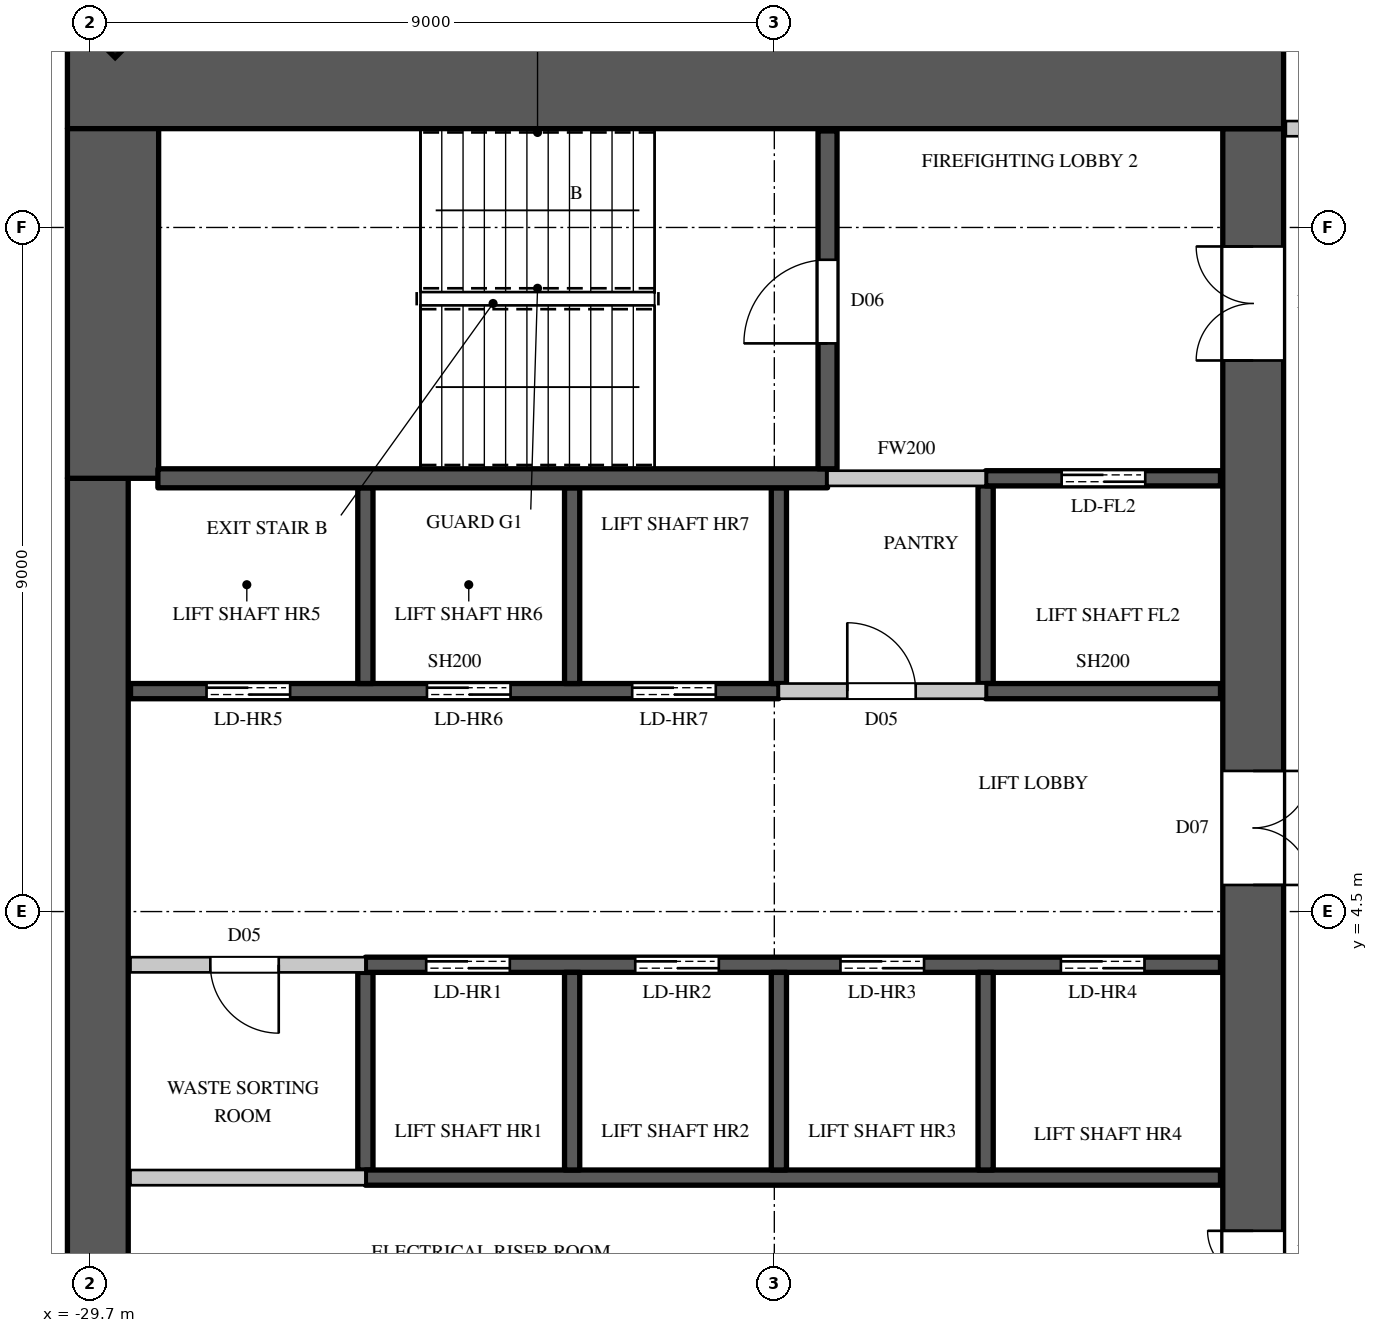
"""IFC4 building model, lengths in metres.
Left out: names, types, materials, properties, quantities, classifications, styles, units other than length and angle.
Written with IfcOpenShell. Run it as: python <this file> out.ifc"""

import sys

from ifc_helpers import new_model, si_unit, direction, frame, frame_2d, origin, origin_2d, place, context, subcontext, project, spatial, rectangle, extrude, element, fill, save


model = new_model("IFC4")
c1 = context("Model", 3, precision=1e-05, world=origin(), true_north=direction((0.0, 1.0)))
c2 = subcontext(c1, "Body", "Model", "MODEL_VIEW")
j1 = project(units=[si_unit("LENGTHUNIT", "METRE"), si_unit("PLANEANGLEUNIT", "RADIAN")], contexts=[c1])
p1 = place(None, origin())
s1 = spatial("IfcSite", under=j1, at=p1, CompositionType="ELEMENT")
p2 = place(p1, origin())
s2 = spatial("IfcBuilding", under=s1, at=p2, CompositionType="ELEMENT")
p3 = place(p2, frame((0.0, 0.0, 168.7)))
s3 = spatial("IfcBuildingStorey", under=s2, at=p3, CompositionType="ELEMENT", Elevation=168.7)
p4 = place(p3, frame((-29.443, 16.443, 0.0), z_axis=(0.0, 0.0, 1.0), x_axis=(-0.707106781187, -0.707106781187, 0.0)))
e1 = element("IfcColumn", 1, at=p4, inside=s3, PredefinedType="COLUMN", context=c2, shape_type="SweptSolid", body=[
    extrude(rectangle(XDim=0.9, YDim=1.1, at=origin_2d()), origin(), (0.0, 0.0, 1.0), 4.1),
])
p5 = place(p3, frame((-30.0, 15.4, 0.0), z_axis=(0.0, 0.0, 1.0), x_axis=(1.0, 0.0, 0.0)))
e2 = element("IfcWall", 2, at=p5, inside=s3, PredefinedType="SHEAR", context=c2, shape_type="SweptSolid", body=[
    extrude(rectangle(XDim=16.0, YDim=1.2, at=frame_2d((8.0, 0.0))), origin(), (0.0, 0.0, 1.0), 4.1),
])
p6 = place(p3, frame((-14.4, -14.8, 0.0), z_axis=(0.0, 0.0, 1.0), x_axis=(0.0, 1.0, 0.0)))
e3 = element("IfcWall", 3, at=p6, inside=s3, PredefinedType="SHEAR", context=c2, shape_type="SweptSolid", body=[
    extrude(rectangle(XDim=29.6, YDim=0.8, at=frame_2d((14.8, 0.0))), origin(), (0.0, 0.0, 1.0), 4.1),
])
p7 = place(p6, frame((1.55, 0.0, 0.0)))
e4 = element("IfcOpeningElement", 4, at=p7, cuts=e3, PredefinedType="OPENING", context=c2, shape_type="SweptSolid", body=[
    extrude(rectangle(XDim=1.5, YDim=2.4, at=frame_2d((0.75, 1.2))), frame((0.0, 0.41, 0.0), z_axis=(0.0, -1.0, 0.0), x_axis=(1.0, 0.0, 0.0)), (0.0, 0.0, 1.0), 0.82),
])
p8 = place(p6, frame((26.55, 0.0, 0.0)))
e5 = element("IfcOpeningElement", 5, at=p8, cuts=e3, PredefinedType="OPENING", context=c2, shape_type="SweptSolid", body=[
    extrude(rectangle(XDim=1.5, YDim=2.4, at=frame_2d((0.75, 1.2))), frame((0.0, 0.41, 0.0), z_axis=(0.0, -1.0, 0.0), x_axis=(1.0, 0.0, 0.0)), (0.0, 0.0, 1.0), 0.82),
])
p9 = place(p6, frame((8.45, 0.0, 0.0)))
e6 = element("IfcOpeningElement", 6, at=p9, cuts=e3, PredefinedType="OPENING", context=c2, shape_type="SweptSolid", body=[
    extrude(rectangle(XDim=1.5, YDim=2.4, at=frame_2d((0.75, 1.2))), frame((0.0, 0.41, 0.0), z_axis=(0.0, -1.0, 0.0), x_axis=(1.0, 0.0, 0.0)), (0.0, 0.0, 1.0), 0.82),
])
p10 = place(p6, frame((19.65, 0.0, 0.0)))
e7 = element("IfcOpeningElement", 7, at=p10, cuts=e3, PredefinedType="OPENING", context=c2, shape_type="SweptSolid", body=[
    extrude(rectangle(XDim=1.5, YDim=2.4, at=frame_2d((0.75, 1.2))), frame((0.0, 0.41, 0.0), z_axis=(0.0, -1.0, 0.0), x_axis=(1.0, 0.0, 0.0)), (0.0, 0.0, 1.0), 0.82),
])
p11 = place(p6, frame((14.5, 0.0, 0.0)))
e8 = element("IfcOpeningElement", 8, at=p11, cuts=e3, PredefinedType="OPENING", context=c2, shape_type="SweptSolid", body=[
    extrude(rectangle(XDim=0.6, YDim=2.0, at=frame_2d((0.3, 1.0))), frame((0.0, 0.41, 0.0), z_axis=(0.0, -1.0, 0.0), x_axis=(1.0, 0.0, 0.0)), (0.0, 0.0, 1.0), 0.82),
])
p12 = place(p3, frame((-29.6, -10.2, 0.0), z_axis=(0.0, 0.0, 1.0), x_axis=(0.0, 1.0, 0.0)))
e9 = element("IfcWall", 9, at=p12, inside=s3, PredefinedType="SHEAR", context=c2, shape_type="SweptSolid", body=[
    extrude(rectangle(XDim=20.4, YDim=0.8, at=frame_2d((10.2, 0.0))), origin(), (0.0, 0.0, 1.0), 4.1),
])
p13 = place(p3, frame((-29.4, 10.2, 0.0), z_axis=(0.0, 0.0, 1.0), x_axis=(0.0, 1.0, 0.0)))
e10 = element("IfcWall", 10, at=p13, inside=s3, PredefinedType="SHEAR", context=c2, shape_type="SweptSolid", body=[
    extrude(rectangle(XDim=4.6, YDim=1.2, at=frame_2d((2.3, 0.0))), origin(), (0.0, 0.0, 1.0), 4.1),
])
p14 = place(p3, frame((-29.17, 3.8, 0.0), z_axis=(0.0, 0.0, 1.0), x_axis=(1.0, 0.0, 0.0)))
e11 = element("IfcWall", 11, at=p14, inside=s3, PredefinedType="PARTITIONING", context=c2, shape_type="SweptSolid", body=[
    extrude(rectangle(XDim=3.09, YDim=0.2, at=frame_2d((1.545, 0.0))), origin(), (0.0, 0.0, 1.0), 3.8),
])
p15 = place(p14, frame((1.05, 0.0, 0.0)))
e12 = element("IfcOpeningElement", 12, at=p15, cuts=e11, PredefinedType="OPENING", context=c2, shape_type="SweptSolid", body=[
    extrude(rectangle(XDim=0.9, YDim=2.2, at=frame_2d((0.45, 1.1))), frame((0.0, 0.11, 0.0), z_axis=(0.0, -1.0, 0.0), x_axis=(1.0, 0.0, 0.0)), (0.0, 0.0, 1.0), 0.22),
])
p16 = place(p3, frame((-20.64, 7.4, 0.0), z_axis=(0.0, 0.0, 1.0), x_axis=(1.0, 0.0, 0.0)))
e13 = element("IfcWall", 13, at=p16, inside=s3, PredefinedType="PARTITIONING", context=c2, shape_type="SweptSolid", body=[
    extrude(rectangle(XDim=2.72, YDim=0.2, at=frame_2d((1.36, 0.0))), origin(), (0.0, 0.0, 1.0), 3.8),
])
p17 = place(p16, frame((0.9, 0.0, 0.0)))
e14 = element("IfcOpeningElement", 14, at=p17, cuts=e13, PredefinedType="OPENING", context=c2, shape_type="SweptSolid", body=[
    extrude(rectangle(XDim=0.9, YDim=2.2, at=frame_2d((0.45, 1.1))), frame((0.0, 0.11, 0.0), z_axis=(0.0, -1.0, 0.0), x_axis=(1.0, 0.0, 0.0)), (0.0, 0.0, 1.0), 0.22),
])
p18 = place(p3, frame((-20.0, 10.2, 0.0), z_axis=(0.0, 0.0, 1.0), x_axis=(1.0, 0.0, 0.0)))
e15 = element("IfcWall", 15, at=p18, inside=s3, PredefinedType="PARTITIONING", context=c2, shape_type="SweptSolid", body=[
    extrude(rectangle(XDim=2.08, YDim=0.2, at=frame_2d((1.04, 0.0))), origin(), (0.0, 0.0, 1.0), 3.8),
])
p19 = place(p3, frame((-13.97, 14.8, 0.0), z_axis=(0.0, 0.0, 1.0), x_axis=(1.0, 0.0, 0.0)))
e16 = element("IfcWall", 16, at=p19, inside=s3, PredefinedType="PARTITIONING", context=c2, shape_type="SweptSolid", body=[
    extrude(rectangle(XDim=2.87, YDim=0.2, at=frame_2d((1.435, 0.0))), origin(), (0.0, 0.0, 1.0), 3.8),
])
p20 = place(p3, frame((-29.17, 1.0, 0.0), z_axis=(0.0, 0.0, 1.0), x_axis=(1.0, 0.0, 0.0)))
e17 = element("IfcWall", 17, at=p20, inside=s3, PredefinedType="PARTITIONING", context=c2, shape_type="SweptSolid", body=[
    extrude(rectangle(XDim=3.09, YDim=0.2, at=frame_2d((1.545, 0.0))), origin(), (0.0, 0.0, 1.0), 3.8),
])
p21 = place(p3, frame((-29.17, 7.4, 0.0), z_axis=(0.0, 0.0, 1.0), x_axis=(1.0, 0.0, 0.0)))
e18 = element("IfcWall", 18, at=p21, inside=s3, PredefinedType="SHEAR", context=c2, shape_type="SweptSolid", body=[
    extrude(rectangle(XDim=8.53, YDim=0.2, at=frame_2d((4.265, 0.0))), origin(), (0.0, 0.0, 1.0), 3.8),
])
p22 = place(p21, frame((1.0, 0.0, 0.0)))
e19 = element("IfcOpeningElement", 19, at=p22, cuts=e18, PredefinedType="OPENING", context=c2, shape_type="SweptSolid", body=[
    extrude(rectangle(XDim=1.1, YDim=2.2, at=frame_2d((0.55, 1.1))), frame((0.0, 0.11, 0.0), z_axis=(0.0, -1.0, 0.0), x_axis=(1.0, 0.0, 0.0)), (0.0, 0.0, 1.0), 0.22),
])
p23 = place(p21, frame((3.9, 0.0, 0.0)))
e20 = element("IfcOpeningElement", 20, at=p23, cuts=e18, PredefinedType="OPENING", context=c2, shape_type="SweptSolid", body=[
    extrude(rectangle(XDim=1.1, YDim=2.2, at=frame_2d((0.55, 1.1))), frame((0.0, 0.11, 0.0), z_axis=(0.0, -1.0, 0.0), x_axis=(1.0, 0.0, 0.0)), (0.0, 0.0, 1.0), 0.22),
])
p24 = place(p21, frame((6.6, 0.0, 0.0)))
e21 = element("IfcOpeningElement", 21, at=p24, cuts=e18, PredefinedType="OPENING", context=c2, shape_type="SweptSolid", body=[
    extrude(rectangle(XDim=1.1, YDim=2.2, at=frame_2d((0.55, 1.1))), frame((0.0, 0.11, 0.0), z_axis=(0.0, -1.0, 0.0), x_axis=(1.0, 0.0, 0.0)), (0.0, 0.0, 1.0), 0.22),
])
p25 = place(p3, frame((-26.08, 1.1, 0.0), z_axis=(0.0, 0.0, 1.0), x_axis=(0.0, 1.0, 0.0)))
e22 = element("IfcWall", 22, at=p25, inside=s3, PredefinedType="SHEAR", context=c2, shape_type="SweptSolid", body=[
    extrude(rectangle(XDim=2.6, YDim=0.2, at=frame_2d((1.3, 0.0))), origin(), (0.0, 0.0, 1.0), 3.8),
])
p26 = place(p3, frame((-26.08, 1.0, 0.0), z_axis=(0.0, 0.0, 1.0), x_axis=(1.0, 0.0, 0.0)))
e23 = element("IfcWall", 23, at=p26, inside=s3, PredefinedType="SHEAR", context=c2, shape_type="SweptSolid", body=[
    extrude(rectangle(XDim=11.25, YDim=0.2, at=frame_2d((5.625, 0.0))), origin(), (0.0, 0.0, 1.0), 3.8),
])
p27 = place(p3, frame((-26.08, 3.8, 0.0), z_axis=(0.0, 0.0, 1.0), x_axis=(1.0, 0.0, 0.0)))
e24 = element("IfcWall", 24, at=p27, inside=s3, PredefinedType="SHEAR", context=c2, shape_type="SweptSolid", body=[
    extrude(rectangle(XDim=11.25, YDim=0.2, at=frame_2d((5.625, 0.0))), origin(), (0.0, 0.0, 1.0), 3.8),
])
p28 = place(p27, frame((0.8, 0.0, 0.0)))
e25 = element("IfcOpeningElement", 25, at=p28, cuts=e24, PredefinedType="OPENING", context=c2, shape_type="SweptSolid", body=[
    extrude(rectangle(XDim=1.1, YDim=2.2, at=frame_2d((0.55, 1.1))), frame((0.0, 0.11, 0.0), z_axis=(0.0, -1.0, 0.0), x_axis=(1.0, 0.0, 0.0)), (0.0, 0.0, 1.0), 0.22),
])
p29 = place(p27, frame((3.55, 0.0, 0.0)))
e26 = element("IfcOpeningElement", 26, at=p29, cuts=e24, PredefinedType="OPENING", context=c2, shape_type="SweptSolid", body=[
    extrude(rectangle(XDim=1.1, YDim=2.2, at=frame_2d((0.55, 1.1))), frame((0.0, 0.11, 0.0), z_axis=(0.0, -1.0, 0.0), x_axis=(1.0, 0.0, 0.0)), (0.0, 0.0, 1.0), 0.22),
])
p30 = place(p27, frame((6.25, 0.0, 0.0)))
e27 = element("IfcOpeningElement", 27, at=p30, cuts=e24, PredefinedType="OPENING", context=c2, shape_type="SweptSolid", body=[
    extrude(rectangle(XDim=1.1, YDim=2.2, at=frame_2d((0.55, 1.1))), frame((0.0, 0.11, 0.0), z_axis=(0.0, -1.0, 0.0), x_axis=(1.0, 0.0, 0.0)), (0.0, 0.0, 1.0), 0.22),
])
p31 = place(p27, frame((9.15, 0.0, 0.0)))
e28 = element("IfcOpeningElement", 28, at=p31, cuts=e24, PredefinedType="OPENING", context=c2, shape_type="SweptSolid", body=[
    extrude(rectangle(XDim=1.1, YDim=2.2, at=frame_2d((0.55, 1.1))), frame((0.0, 0.11, 0.0), z_axis=(0.0, -1.0, 0.0), x_axis=(1.0, 0.0, 0.0)), (0.0, 0.0, 1.0), 0.22),
])
p32 = place(p3, frame((-26.08, 7.5, 0.0), z_axis=(0.0, 0.0, 1.0), x_axis=(0.0, 1.0, 0.0)))
e29 = element("IfcWall", 29, at=p32, inside=s3, PredefinedType="SHEAR", context=c2, shape_type="SweptSolid", body=[
    extrude(rectangle(XDim=2.575, YDim=0.2, at=frame_2d((1.288, 0.0))), origin(), (0.0, 0.0, 1.0), 4.1),
])
p33 = place(p3, frame((-23.36, 1.1, 0.0), z_axis=(0.0, 0.0, 1.0), x_axis=(0.0, 1.0, 0.0)))
e30 = element("IfcWall", 30, at=p33, inside=s3, PredefinedType="SHEAR", context=c2, shape_type="SweptSolid", body=[
    extrude(rectangle(XDim=2.6, YDim=0.2, at=frame_2d((1.3, 0.0))), origin(), (0.0, 0.0, 1.0), 4.1),
])
p34 = place(p3, frame((-23.36, 7.5, 0.0), z_axis=(0.0, 0.0, 1.0), x_axis=(0.0, 1.0, 0.0)))
e31 = element("IfcWall", 31, at=p34, inside=s3, PredefinedType="SHEAR", context=c2, shape_type="SweptSolid", body=[
    extrude(rectangle(XDim=2.575, YDim=0.2, at=frame_2d((1.288, 0.0))), origin(), (0.0, 0.0, 1.0), 4.1),
])
p35 = place(p3, frame((-20.64, 1.1, 0.0), z_axis=(0.0, 0.0, 1.0), x_axis=(0.0, 1.0, 0.0)))
e32 = element("IfcWall", 32, at=p35, inside=s3, PredefinedType="SHEAR", context=c2, shape_type="SweptSolid", body=[
    extrude(rectangle(XDim=2.6, YDim=0.2, at=frame_2d((1.3, 0.0))), origin(), (0.0, 0.0, 1.0), 4.1),
])
p36 = place(p3, frame((-20.64, 7.5, 0.0), z_axis=(0.0, 0.0, 1.0), x_axis=(0.0, 1.0, 0.0)))
e33 = element("IfcWall", 33, at=p36, inside=s3, PredefinedType="SHEAR", context=c2, shape_type="SweptSolid", body=[
    extrude(rectangle(XDim=2.575, YDim=0.2, at=frame_2d((1.288, 0.0))), origin(), (0.0, 0.0, 1.0), 3.8),
])
p37 = place(p3, frame((-17.92, 1.1, 0.0), z_axis=(0.0, 0.0, 1.0), x_axis=(0.0, 1.0, 0.0)))
e34 = element("IfcWall", 34, at=p37, inside=s3, PredefinedType="SHEAR", context=c2, shape_type="SweptSolid", body=[
    extrude(rectangle(XDim=2.6, YDim=0.2, at=frame_2d((1.3, 0.0))), origin(), (0.0, 0.0, 1.0), 4.1),
])
p38 = place(p3, frame((-17.92, 7.5, 0.0), z_axis=(0.0, 0.0, 1.0), x_axis=(0.0, 1.0, 0.0)))
e35 = element("IfcWall", 35, at=p38, inside=s3, PredefinedType="SHEAR", context=c2, shape_type="SweptSolid", body=[
    extrude(rectangle(XDim=2.6, YDim=0.2, at=frame_2d((1.3, 0.0))), origin(), (0.0, 0.0, 1.0), 3.8),
])
p39 = place(p3, frame((-17.92, 7.4, 0.0), z_axis=(0.0, 0.0, 1.0), x_axis=(1.0, 0.0, 0.0)))
e36 = element("IfcWall", 36, at=p39, inside=s3, PredefinedType="SHEAR", context=c2, shape_type="SweptSolid", body=[
    extrude(rectangle(XDim=3.09, YDim=0.2, at=frame_2d((1.545, 0.0))), origin(), (0.0, 0.0, 1.0), 3.8),
])
p40 = place(p3, frame((-17.92, 10.2, 0.0), z_axis=(0.0, 0.0, 1.0), x_axis=(1.0, 0.0, 0.0)))
e37 = element("IfcWall", 37, at=p40, inside=s3, PredefinedType="SHEAR", context=c2, shape_type="SweptSolid", body=[
    extrude(rectangle(XDim=3.09, YDim=0.2, at=frame_2d((1.545, 0.0))), origin(), (0.0, 0.0, 1.0), 3.8),
])
p41 = place(p40, frame((1.0, 0.0, 0.0)))
e38 = element("IfcOpeningElement", 38, at=p41, cuts=e37, PredefinedType="OPENING", context=c2, shape_type="SweptSolid", body=[
    extrude(rectangle(XDim=1.1, YDim=2.2, at=frame_2d((0.55, 1.1))), frame((0.0, 0.11, 0.0), z_axis=(0.0, -1.0, 0.0), x_axis=(1.0, 0.0, 0.0)), (0.0, 0.0, 1.0), 0.22),
])
p42 = place(p3, frame((-28.81, 10.2, 0.0), z_axis=(0.0, 0.0, 1.0), x_axis=(1.0, 0.0, 0.0)))
e39 = element("IfcWall", 39, at=p42, inside=s3, PredefinedType="SHEAR", context=c2, shape_type="SweptSolid", body=[
    extrude(rectangle(XDim=8.81, YDim=0.25, at=frame_2d((4.405, 0.0))), origin(), (0.0, 0.0, 1.0), 3.8),
])
p43 = place(p3, frame((-20.0, 10.325, 0.0), z_axis=(0.0, 0.0, 1.0), x_axis=(0.0, 1.0, 0.0)))
e40 = element("IfcWall", 40, at=p43, inside=s3, PredefinedType="SHEAR", context=c2, shape_type="SweptSolid", body=[
    extrude(rectangle(XDim=4.445, YDim=0.25, at=frame_2d((2.223, 0.0))), origin(), (0.0, 0.0, 1.0), 3.8),
])
p44 = place(p43, frame((1.65, 0.0, 0.0)))
e41 = element("IfcOpeningElement", 41, at=p44, cuts=e40, PredefinedType="OPENING", context=c2, shape_type="SweptSolid", body=[
    extrude(rectangle(XDim=1.1, YDim=2.2, at=frame_2d((0.55, 1.1))), frame((0.0, 0.135, 0.0), z_axis=(0.0, -1.0, 0.0), x_axis=(1.0, 0.0, 0.0)), (0.0, 0.0, 1.0), 0.27),
])
p45 = place(p44, origin())
e42 = element("IfcDoor", 42, at=p45, inside=s3, OperationType="SINGLE_SWING_LEFT", PredefinedType="DOOR", context=c2, shape_type="SweptSolid", body=[
    extrude(rectangle(XDim=1.1, YDim=2.2, at=frame_2d((0.55, 1.1))), frame((0.0, 0.025, 0.0), z_axis=(0.0, -1.0, 0.0), x_axis=(1.0, 0.0, 0.0)), (0.0, 0.0, 1.0), 0.05),
])
fill(e41, e42)
p46 = place(p15, origin())
e43 = element("IfcDoor", 43, at=p46, inside=s3, OperationType="SINGLE_SWING_LEFT", PredefinedType="DOOR", context=c2, shape_type="SweptSolid", body=[
    extrude(rectangle(XDim=0.9, YDim=2.2, at=frame_2d((0.45, 1.1))), frame((0.0, 0.025, 0.0), z_axis=(0.0, -1.0, 0.0), x_axis=(1.0, 0.0, 0.0)), (0.0, 0.0, 1.0), 0.05),
])
fill(e12, e43)
p47 = place(p17, origin())
e44 = element("IfcDoor", 44, at=p47, inside=s3, OperationType="SINGLE_SWING_LEFT", PredefinedType="DOOR", context=c2, shape_type="SweptSolid", body=[
    extrude(rectangle(XDim=0.9, YDim=2.2, at=frame_2d((0.45, 1.1))), frame((0.0, 0.025, 0.0), z_axis=(0.0, -1.0, 0.0), x_axis=(1.0, 0.0, 0.0)), (0.0, 0.0, 1.0), 0.05),
])
fill(e14, e44)
p48 = place(p28, origin())
e45 = element("IfcDoor", 45, at=p48, inside=s3, OperationType="DOUBLE_DOOR_SLIDING", PredefinedType="DOOR", context=c2, shape_type="SweptSolid", body=[
    extrude(rectangle(XDim=1.1, YDim=2.2, at=frame_2d((0.55, 1.1))), frame((0.0, 0.025, 0.0), z_axis=(0.0, -1.0, 0.0), x_axis=(1.0, 0.0, 0.0)), (0.0, 0.0, 1.0), 0.05),
])
fill(e25, e45)
p49 = place(p29, origin())
e46 = element("IfcDoor", 46, at=p49, inside=s3, OperationType="DOUBLE_DOOR_SLIDING", PredefinedType="DOOR", context=c2, shape_type="SweptSolid", body=[
    extrude(rectangle(XDim=1.1, YDim=2.2, at=frame_2d((0.55, 1.1))), frame((0.0, 0.025, 0.0), z_axis=(0.0, -1.0, 0.0), x_axis=(1.0, 0.0, 0.0)), (0.0, 0.0, 1.0), 0.05),
])
fill(e26, e46)
p50 = place(p30, origin())
e47 = element("IfcDoor", 47, at=p50, inside=s3, OperationType="DOUBLE_DOOR_SLIDING", PredefinedType="DOOR", context=c2, shape_type="SweptSolid", body=[
    extrude(rectangle(XDim=1.1, YDim=2.2, at=frame_2d((0.55, 1.1))), frame((0.0, 0.025, 0.0), z_axis=(0.0, -1.0, 0.0), x_axis=(1.0, 0.0, 0.0)), (0.0, 0.0, 1.0), 0.05),
])
fill(e27, e47)
p51 = place(p31, origin())
e48 = element("IfcDoor", 48, at=p51, inside=s3, OperationType="DOUBLE_DOOR_SLIDING", PredefinedType="DOOR", context=c2, shape_type="SweptSolid", body=[
    extrude(rectangle(XDim=1.1, YDim=2.2, at=frame_2d((0.55, 1.1))), frame((0.0, 0.025, 0.0), z_axis=(0.0, -1.0, 0.0), x_axis=(1.0, 0.0, 0.0)), (0.0, 0.0, 1.0), 0.05),
])
fill(e28, e48)
p52 = place(p22, origin())
e49 = element("IfcDoor", 49, at=p52, inside=s3, OperationType="DOUBLE_DOOR_SLIDING", PredefinedType="DOOR", context=c2, shape_type="SweptSolid", body=[
    extrude(rectangle(XDim=1.1, YDim=2.2, at=frame_2d((0.55, 1.1))), frame((0.0, 0.025, 0.0), z_axis=(0.0, -1.0, 0.0), x_axis=(1.0, 0.0, 0.0)), (0.0, 0.0, 1.0), 0.05),
])
fill(e19, e49)
p53 = place(p23, origin())
e50 = element("IfcDoor", 50, at=p53, inside=s3, OperationType="DOUBLE_DOOR_SLIDING", PredefinedType="DOOR", context=c2, shape_type="SweptSolid", body=[
    extrude(rectangle(XDim=1.1, YDim=2.2, at=frame_2d((0.55, 1.1))), frame((0.0, 0.025, 0.0), z_axis=(0.0, -1.0, 0.0), x_axis=(1.0, 0.0, 0.0)), (0.0, 0.0, 1.0), 0.05),
])
fill(e20, e50)
p54 = place(p24, origin())
e51 = element("IfcDoor", 51, at=p54, inside=s3, OperationType="DOUBLE_DOOR_SLIDING", PredefinedType="DOOR", context=c2, shape_type="SweptSolid", body=[
    extrude(rectangle(XDim=1.1, YDim=2.2, at=frame_2d((0.55, 1.1))), frame((0.0, 0.025, 0.0), z_axis=(0.0, -1.0, 0.0), x_axis=(1.0, 0.0, 0.0)), (0.0, 0.0, 1.0), 0.05),
])
fill(e21, e51)
p55 = place(p41, origin())
e52 = element("IfcDoor", 52, at=p55, inside=s3, OperationType="DOUBLE_DOOR_SLIDING", PredefinedType="DOOR", context=c2, shape_type="SweptSolid", body=[
    extrude(rectangle(XDim=1.1, YDim=2.2, at=frame_2d((0.55, 1.1))), frame((0.0, 0.025, 0.0), z_axis=(0.0, -1.0, 0.0), x_axis=(1.0, 0.0, 0.0)), (0.0, 0.0, 1.0), 0.05),
])
fill(e38, e52)
p56 = place(p8, origin())
e53 = element("IfcDoor", 53, at=p56, inside=s3, OperationType="DOUBLE_DOOR_SINGLE_SWING", PredefinedType="DOOR", context=c2, shape_type="SweptSolid", body=[
    extrude(rectangle(XDim=1.5, YDim=2.4, at=frame_2d((0.75, 1.2))), frame((0.0, 0.395, 0.0), z_axis=(0.0, -1.0, 0.0), x_axis=(1.0, 0.0, 0.0)), (0.0, 0.0, 1.0), 0.05),
])
fill(e5, e53)
p57 = place(p10, origin())
e54 = element("IfcDoor", 54, at=p57, inside=s3, OperationType="DOUBLE_DOOR_SINGLE_SWING", PredefinedType="DOOR", context=c2, shape_type="SweptSolid", body=[
    extrude(rectangle(XDim=1.5, YDim=2.4, at=frame_2d((0.75, 1.2))), frame((0.0, -0.345, 0.0), z_axis=(0.0, -1.0, 0.0), x_axis=(1.0, 0.0, 0.0)), (0.0, 0.0, 1.0), 0.05),
])
fill(e7, e54)
p58 = place(p11, origin())
e55 = element("IfcDoor", 55, at=p58, inside=s3, OperationType="SINGLE_SWING_RIGHT", PredefinedType="DOOR", context=c2, shape_type="SweptSolid", body=[
    extrude(rectangle(XDim=0.6, YDim=2.0, at=frame_2d((0.3, 1.0))), frame((0.0, 0.395, 0.0), z_axis=(0.0, -1.0, 0.0), x_axis=(1.0, 0.0, 0.0)), (0.0, 0.0, 1.0), 0.05),
])
fill(e8, e55)
save(model, sys.argv[1])
